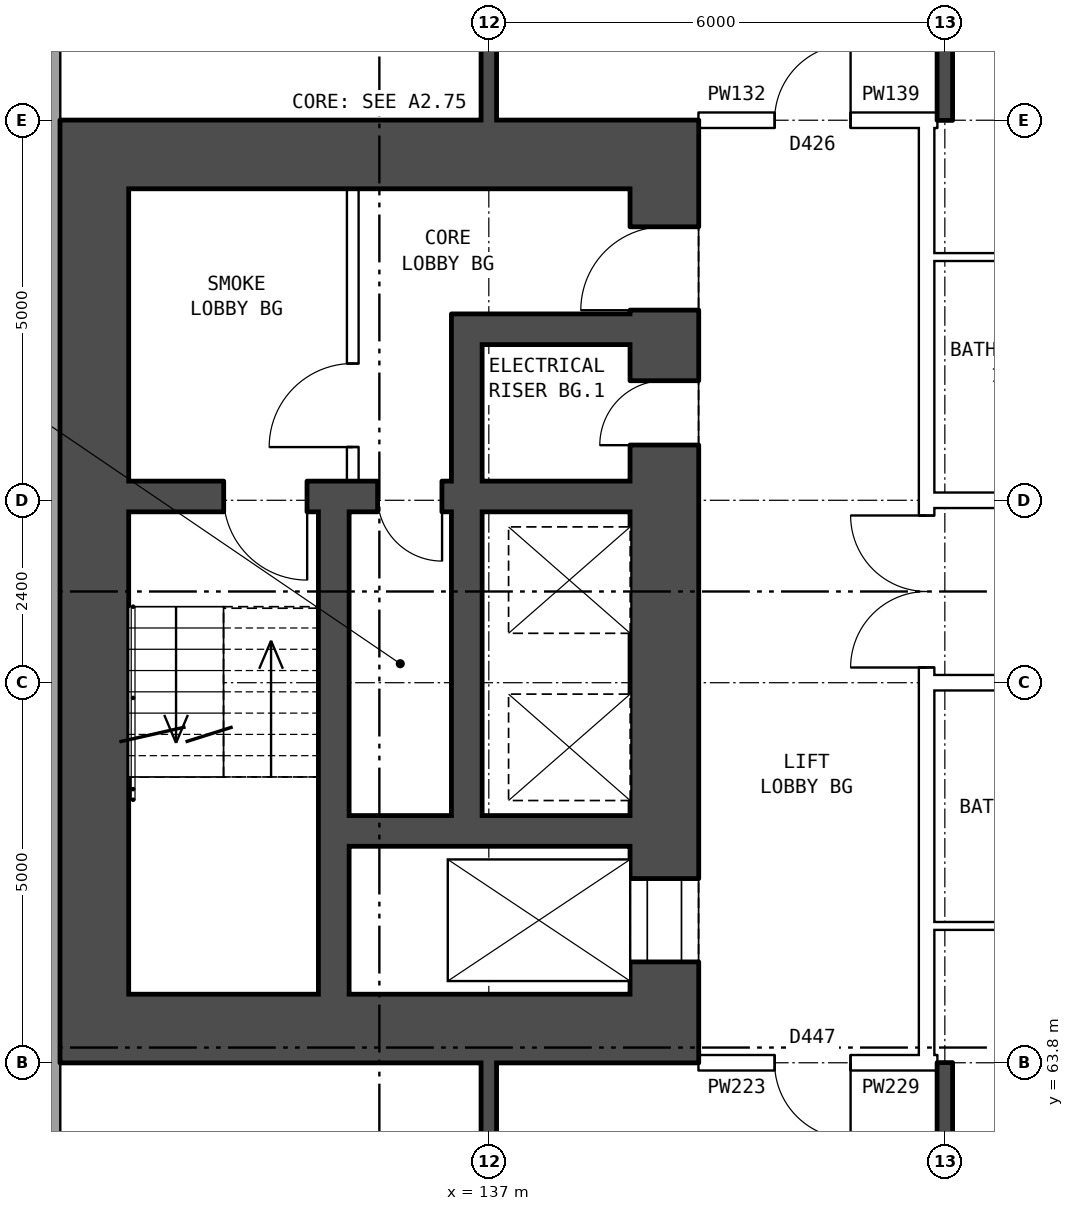
"""IFC4 building model, lengths in metres.
Left out: names, types, materials, properties, quantities, classifications, styles, units other than length and angle.
Written with IfcOpenShell. Run it as: python <this file> out.ifc"""

import sys

from ifc_helpers import new_model, si_unit, direction, frame, frame_2d, origin, place, context, subcontext, project, spatial, rectangle, extrude, element, fill, save


model = new_model("IFC4")
c1 = context("Model", 3, precision=1e-05, world=origin(), true_north=direction((0.0, 1.0)))
c2 = subcontext(c1, "Body", "Model", "MODEL_VIEW")
j1 = project(units=[si_unit("LENGTHUNIT", "METRE"), si_unit("PLANEANGLEUNIT", "RADIAN")], contexts=[c1])
p1 = place(None, origin())
s1 = spatial("IfcSite", under=j1, at=p1, CompositionType="ELEMENT")
p2 = place(p1, origin())
s2 = spatial("IfcBuilding", under=s1, at=p2, CompositionType="ELEMENT")
p3 = place(p2, frame((0.0, 0.0, 22.6)))
s3 = spatial("IfcBuildingStorey", under=s2, at=p3, CompositionType="ELEMENT", Elevation=22.6)
p4 = place(p3, frame((131.18, 82.925, 0.0), z_axis=(0.0, 0.0, 1.0), x_axis=(0.0, -1.0, 0.0)))
e1 = element("IfcWall", 1, at=p4, inside=s3, PredefinedType="STANDARD", context=c2, shape_type="SweptSolid", body=[
    extrude(rectangle(XDim=25.851, YDim=0.36, at=frame_2d((12.925, 0.0))), origin(), (0.0, 0.0, 1.0), 2.85),
])
p5 = place(p4, frame((1.625, 0.0, 0.8)))
e2 = element("IfcOpeningElement", 2, at=p5, cuts=e1, PredefinedType="OPENING", context=c2, shape_type="SweptSolid", body=[
    extrude(rectangle(XDim=1.6, YDim=1.8, at=frame_2d((0.8, 0.9))), frame((0.0, 0.19, 0.0), z_axis=(0.0, -1.0, 0.0), x_axis=(1.0, 0.0, 0.0)), (0.0, 0.0, 1.0), 0.38),
])
p6 = place(p4, frame((3.525, 0.0, 1.7)))
e3 = element("IfcOpeningElement", 3, at=p6, cuts=e1, PredefinedType="OPENING", context=c2, shape_type="SweptSolid", body=[
    extrude(rectangle(XDim=1.4, YDim=0.9, at=frame_2d((0.7, 0.45))), frame((0.0, 0.19, 0.0), z_axis=(0.0, -1.0, 0.0), x_axis=(1.0, 0.0, 0.0)), (0.0, 0.0, 1.0), 0.38),
])
p7 = place(p4, frame((20.825, 0.0, 1.7)))
e4 = element("IfcOpeningElement", 4, at=p7, cuts=e1, PredefinedType="OPENING", context=c2, shape_type="SweptSolid", body=[
    extrude(rectangle(XDim=1.4, YDim=0.9, at=frame_2d((0.7, 0.45))), frame((0.0, 0.19, 0.0), z_axis=(0.0, -1.0, 0.0), x_axis=(1.0, 0.0, 0.0)), (0.0, 0.0, 1.0), 0.38),
])
p8 = place(p4, frame((22.625, 0.0, 0.8)))
e5 = element("IfcOpeningElement", 5, at=p8, cuts=e1, PredefinedType="OPENING", context=c2, shape_type="SweptSolid", body=[
    extrude(rectangle(XDim=1.6, YDim=1.8, at=frame_2d((0.8, 0.9))), frame((0.0, 0.19, 0.0), z_axis=(0.0, -1.0, 0.0), x_axis=(1.0, 0.0, 0.0)), (0.0, 0.0, 1.0), 0.38),
])
p9 = place(p3, frame((139.31, 64.7, 0.0), z_axis=(0.0, 0.0, 1.0), x_axis=(0.0, 1.0, 0.0)))
e6 = element("IfcWall", 6, at=p9, inside=s3, PredefinedType="SHEAR", context=c2, shape_type="SweptSolid", body=[
    extrude(rectangle(XDim=10.6, YDim=0.9, at=frame_2d((5.3, 0.0))), origin(), (0.0, 0.0, 1.0), 2.85),
])
p10 = place(p9, frame((0.425, 0.0, 0.0)))
e7 = element("IfcOpeningElement", 7, at=p10, cuts=e6, PredefinedType="OPENING", context=c2, shape_type="SweptSolid", body=[
    extrude(rectangle(XDim=1.1, YDim=2.1, at=frame_2d((0.55, 1.05))), frame((0.0, 0.46, 0.0), z_axis=(0.0, -1.0, 0.0), x_axis=(1.0, 0.0, 0.0)), (0.0, 0.0, 1.0), 0.92),
])
p11 = place(p9, frame((9.0, 0.0, 0.0)))
e8 = element("IfcOpeningElement", 8, at=p11, cuts=e6, PredefinedType="OPENING", context=c2, shape_type="SweptSolid", body=[
    extrude(rectangle(XDim=1.1, YDim=2.1, at=frame_2d((0.55, 1.05))), frame((0.0, 0.46, 0.0), z_axis=(0.0, -1.0, 0.0), x_axis=(1.0, 0.0, 0.0)), (0.0, 0.0, 1.0), 0.92),
])
p12 = place(p9, frame((7.225, 0.0, 0.0)))
e9 = element("IfcOpeningElement", 9, at=p12, cuts=e6, PredefinedType="OPENING", context=c2, shape_type="SweptSolid", body=[
    extrude(rectangle(XDim=0.85, YDim=2.1, at=frame_2d((0.425, 1.05))), frame((0.0, 0.46, 0.0), z_axis=(0.0, -1.0, 0.0), x_axis=(1.0, 0.0, 0.0)), (0.0, 0.0, 1.0), 0.92),
])
p13 = place(p3, frame((131.81, 64.7, 0.0), z_axis=(0.0, 0.0, 1.0), x_axis=(0.0, 1.0, 0.0)))
e10 = element("IfcWall", 10, at=p13, inside=s3, PredefinedType="SHEAR", context=c2, shape_type="SweptSolid", body=[
    extrude(rectangle(XDim=10.6, YDim=0.9, at=frame_2d((5.3, 0.0))), origin(), (0.0, 0.0, 1.0), 2.85),
])
for number, where, z_axis, x_axis in (
    (11, (139.76, 64.25, 0.0), (0.0, 0.0, 1.0), (-1.0, 0.0, 0.0)),
    (12, (139.76, 75.75, 0.0), (0.0, 0.0, 1.0), (-1.0, 0.0, 0.0)),
):
    element("IfcWall", number, at=place(p3, frame(where, z_axis=z_axis, x_axis=x_axis)), inside=s3, PredefinedType="SHEAR", context=c2, shape_type="SweptSolid", body=[
        extrude(rectangle(XDim=8.4, YDim=0.9, at=frame_2d((4.2, 0.0))), origin(), (0.0, 0.0, 1.0), 2.85),
    ])
p14 = place(p3, frame((138.86, 66.85, 0.0), z_axis=(0.0, 0.0, 1.0), x_axis=(-1.0, 0.0, 0.0)))
e13 = element("IfcWall", 13, at=p14, inside=s3, PredefinedType="SHEAR", context=c2, shape_type="SweptSolid", body=[
    extrude(rectangle(XDim=3.7, YDim=0.4, at=frame_2d((1.85, 0.0))), origin(), (0.0, 0.0, 1.0), 2.85),
])
p15 = place(p3, frame((138.86, 71.25, 0.0), z_axis=(0.0, 0.0, 1.0), x_axis=(-1.0, 0.0, 0.0)))
e14 = element("IfcWall", 14, at=p15, inside=s3, PredefinedType="SHEAR", context=c2, shape_type="SweptSolid", body=[
    extrude(rectangle(XDim=6.6, YDim=0.4, at=frame_2d((3.3, 0.0))), origin(), (0.0, 0.0, 1.0), 2.85),
])
p16 = place(p15, frame((4.25, 0.0, 0.0)))
e15 = element("IfcOpeningElement", 15, at=p16, cuts=e14, PredefinedType="OPENING", context=c2, shape_type="SweptSolid", body=[
    extrude(rectangle(XDim=1.1, YDim=2.1, at=frame_2d((0.55, 1.05))), frame((0.0, 0.21, 0.0), z_axis=(0.0, -1.0, 0.0), x_axis=(1.0, 0.0, 0.0)), (0.0, 0.0, 1.0), 0.42),
])
p17 = place(p15, frame((2.475, 0.0, 0.0)))
e16 = element("IfcOpeningElement", 16, at=p17, cuts=e14, PredefinedType="OPENING", context=c2, shape_type="SweptSolid", body=[
    extrude(rectangle(XDim=0.85, YDim=2.1, at=frame_2d((0.425, 1.05))), frame((0.0, 0.21, 0.0), z_axis=(0.0, -1.0, 0.0), x_axis=(1.0, 0.0, 0.0)), (0.0, 0.0, 1.0), 0.42),
])
p18 = place(p3, frame((138.86, 73.45, 0.0), z_axis=(0.0, 0.0, 1.0), x_axis=(-1.0, 0.0, 0.0)))
e17 = element("IfcWall", 17, at=p18, inside=s3, PredefinedType="SHEAR", context=c2, shape_type="SweptSolid", body=[
    extrude(rectangle(XDim=1.95, YDim=0.4, at=frame_2d((0.975, 0.0))), origin(), (0.0, 0.0, 1.0), 2.85),
])
p19 = place(p3, frame((136.71, 67.05, 0.0), z_axis=(0.0, 0.0, 1.0), x_axis=(0.0, 1.0, 0.0)))
e18 = element("IfcWall", 18, at=p19, inside=s3, PredefinedType="SHEAR", context=c2, shape_type="SweptSolid", body=[
    extrude(rectangle(XDim=4.0, YDim=0.4, at=frame_2d((2.0, 0.0))), origin(), (0.0, 0.0, 1.0), 2.85),
])
p20 = place(p3, frame((136.71, 71.45, 0.0), z_axis=(0.0, 0.0, 1.0), x_axis=(0.0, 1.0, 0.0)))
e19 = element("IfcWall", 19, at=p20, inside=s3, PredefinedType="SHEAR", context=c2, shape_type="SweptSolid", body=[
    extrude(rectangle(XDim=2.2, YDim=0.4, at=frame_2d((1.1, 0.0))), origin(), (0.0, 0.0, 1.0), 2.85),
])
p21 = place(p3, frame((135.21, 71.45, 0.0), z_axis=(0.0, 0.0, 1.0), x_axis=(0.0, 1.0, 0.0)))
e20 = element("IfcWall", 20, at=p21, inside=s3, PredefinedType="PARTITIONING", context=c2, shape_type="SweptSolid", body=[
    extrude(rectangle(XDim=3.85, YDim=0.15, at=frame_2d((1.925, 0.0))), origin(), (0.0, 0.0, 1.0), 2.85),
])
p22 = place(p21, frame((0.45, 0.0, 0.0)))
e21 = element("IfcOpeningElement", 21, at=p22, cuts=e20, PredefinedType="OPENING", context=c2, shape_type="SweptSolid", body=[
    extrude(rectangle(XDim=1.1, YDim=2.1, at=frame_2d((0.55, 1.05))), frame((0.0, 0.085, 0.0), z_axis=(0.0, -1.0, 0.0), x_axis=(1.0, 0.0, 0.0)), (0.0, 0.0, 1.0), 0.17),
])
p23 = place(p3, frame((134.96, 64.7, 0.0), z_axis=(0.0, 0.0, 1.0), x_axis=(0.0, 1.0, 0.0)))
e22 = element("IfcWall", 22, at=p23, inside=s3, PredefinedType="SHEAR", context=c2, shape_type="SweptSolid", body=[
    extrude(rectangle(XDim=6.35, YDim=0.4, at=frame_2d((3.175, 0.0))), origin(), (0.0, 0.0, 1.0), 2.85),
])
p24 = place(p3, frame((142.76, 63.9, 0.0), z_axis=(0.0, 0.0, 1.0), x_axis=(0.0, 1.0, 0.0)))
e23 = element("IfcWall", 23, at=p24, inside=s3, PredefinedType="PARTITIONING", context=c2, shape_type="SweptSolid", body=[
    extrude(rectangle(XDim=12.2, YDim=0.2, at=frame_2d((6.1, 0.0))), origin(), (0.0, 0.0, 1.0), 2.85),
])
p25 = place(p24, frame((5.1, 0.0, 0.0)))
e24 = element("IfcOpeningElement", 24, at=p25, cuts=e23, PredefinedType="OPENING", context=c2, shape_type="SweptSolid", body=[
    extrude(rectangle(XDim=2.0, YDim=2.1, at=frame_2d((1.0, 1.05))), frame((0.0, 0.11, 0.0), z_axis=(0.0, -1.0, 0.0), x_axis=(1.0, 0.0, 0.0)), (0.0, 0.0, 1.0), 0.22),
])
p26 = place(p3, frame((139.76, 63.8, 0.0), z_axis=(0.0, 0.0, 1.0), x_axis=(1.0, 0.0, 0.0)))
e25 = element("IfcWall", 25, at=p26, inside=s3, PredefinedType="PARTITIONING", context=c2, shape_type="SweptSolid", body=[
    extrude(rectangle(XDim=3.0, YDim=0.2, at=frame_2d((1.5, 0.0))), origin(), (0.0, 0.0, 1.0), 2.85),
])
p27 = place(p26, frame((1.0, 0.0, 0.0)))
e26 = element("IfcOpeningElement", 26, at=p27, cuts=e25, PredefinedType="OPENING", context=c2, shape_type="SweptSolid", body=[
    extrude(rectangle(XDim=1.0, YDim=2.1, at=frame_2d((0.5, 1.05))), frame((0.0, 0.11, 0.0), z_axis=(0.0, -1.0, 0.0), x_axis=(1.0, 0.0, 0.0)), (0.0, 0.0, 1.0), 0.22),
])
p28 = place(p3, frame((142.76, 63.8, 0.0), z_axis=(0.0, 0.0, 1.0), x_axis=(1.0, 0.0, 0.0)))
e27 = element("IfcWall", 27, at=p28, inside=s3, PredefinedType="PARTITIONING", context=c2, shape_type="SweptSolid", body=[
    extrude(rectangle(XDim=0.14, YDim=0.2, at=frame_2d((0.07, 0.0))), origin(), (0.0, 0.0, 1.0), 2.85),
])
p29 = place(p3, frame((142.76, 65.6, 0.0), z_axis=(0.0, 0.0, 1.0), x_axis=(1.0, 0.0, 0.0)))
e28 = element("IfcWall", 28, at=p29, inside=s3, PredefinedType="PARTITIONING", context=c2, shape_type="SweptSolid", body=[
    extrude(rectangle(XDim=3.24, YDim=0.1, at=frame_2d((1.62, 0.0))), origin(), (0.0, 0.0, 1.0), 2.85),
])
p30 = place(p3, frame((142.76, 68.8, 0.0), z_axis=(0.0, 0.0, 1.0), x_axis=(1.0, 0.0, 0.0)))
e29 = element("IfcWall", 29, at=p30, inside=s3, PredefinedType="PARTITIONING", context=c2, shape_type="SweptSolid", body=[
    extrude(rectangle(XDim=14.48, YDim=0.2, at=frame_2d((7.24, 0.0))), origin(), (0.0, 0.0, 1.0), 2.85),
])
p31 = place(p30, frame((4.24, 0.0, 0.0)))
e30 = element("IfcOpeningElement", 30, at=p31, cuts=e29, PredefinedType="OPENING", context=c2, shape_type="SweptSolid", body=[
    extrude(rectangle(XDim=1.0, YDim=2.1, at=frame_2d((0.5, 1.05))), frame((0.0, 0.11, 0.0), z_axis=(0.0, -1.0, 0.0), x_axis=(1.0, 0.0, 0.0)), (0.0, 0.0, 1.0), 0.22),
])
p32 = place(p30, frame((7.24, 0.0, 0.0)))
e31 = element("IfcOpeningElement", 31, at=p32, cuts=e29, PredefinedType="OPENING", context=c2, shape_type="SweptSolid", body=[
    extrude(rectangle(XDim=1.0, YDim=2.1, at=frame_2d((0.5, 1.05))), frame((0.0, 0.11, 0.0), z_axis=(0.0, -1.0, 0.0), x_axis=(1.0, 0.0, 0.0)), (0.0, 0.0, 1.0), 0.22),
])
p33 = place(p3, frame((142.76, 71.2, 0.0), z_axis=(0.0, 0.0, 1.0), x_axis=(1.0, 0.0, 0.0)))
e32 = element("IfcWall", 32, at=p33, inside=s3, PredefinedType="PARTITIONING", context=c2, shape_type="SweptSolid", body=[
    extrude(rectangle(XDim=14.48, YDim=0.2, at=frame_2d((7.24, 0.0))), origin(), (0.0, 0.0, 1.0), 2.85),
])
p34 = place(p33, frame((4.24, 0.0, 0.0)))
e33 = element("IfcOpeningElement", 33, at=p34, cuts=e32, PredefinedType="OPENING", context=c2, shape_type="SweptSolid", body=[
    extrude(rectangle(XDim=1.0, YDim=2.1, at=frame_2d((0.5, 1.05))), frame((0.0, 0.11, 0.0), z_axis=(0.0, -1.0, 0.0), x_axis=(1.0, 0.0, 0.0)), (0.0, 0.0, 1.0), 0.22),
])
p35 = place(p33, frame((10.24, 0.0, 0.0)))
e34 = element("IfcOpeningElement", 34, at=p35, cuts=e32, PredefinedType="OPENING", context=c2, shape_type="SweptSolid", body=[
    extrude(rectangle(XDim=1.0, YDim=2.1, at=frame_2d((0.5, 1.05))), frame((0.0, 0.11, 0.0), z_axis=(0.0, -1.0, 0.0), x_axis=(1.0, 0.0, 0.0)), (0.0, 0.0, 1.0), 0.22),
])
p36 = place(p3, frame((142.76, 74.4, 0.0), z_axis=(0.0, 0.0, 1.0), x_axis=(1.0, 0.0, 0.0)))
e35 = element("IfcWall", 35, at=p36, inside=s3, PredefinedType="PARTITIONING", context=c2, shape_type="SweptSolid", body=[
    extrude(rectangle(XDim=3.24, YDim=0.1, at=frame_2d((1.62, 0.0))), origin(), (0.0, 0.0, 1.0), 2.85),
])
p37 = place(p3, frame((139.76, 76.2, 0.0), z_axis=(0.0, 0.0, 1.0), x_axis=(1.0, 0.0, 0.0)))
e36 = element("IfcWall", 36, at=p37, inside=s3, PredefinedType="PARTITIONING", context=c2, shape_type="SweptSolid", body=[
    extrude(rectangle(XDim=3.0, YDim=0.2, at=frame_2d((1.5, 0.0))), origin(), (0.0, 0.0, 1.0), 2.85),
])
p38 = place(p37, frame((1.0, 0.0, 0.0)))
e37 = element("IfcOpeningElement", 37, at=p38, cuts=e36, PredefinedType="OPENING", context=c2, shape_type="SweptSolid", body=[
    extrude(rectangle(XDim=1.0, YDim=2.1, at=frame_2d((0.5, 1.05))), frame((0.0, 0.11, 0.0), z_axis=(0.0, -1.0, 0.0), x_axis=(1.0, 0.0, 0.0)), (0.0, 0.0, 1.0), 0.22),
])
p39 = place(p3, frame((142.76, 76.2, 0.0), z_axis=(0.0, 0.0, 1.0), x_axis=(1.0, 0.0, 0.0)))
e38 = element("IfcWall", 38, at=p39, inside=s3, PredefinedType="PARTITIONING", context=c2, shape_type="SweptSolid", body=[
    extrude(rectangle(XDim=0.14, YDim=0.2, at=frame_2d((0.07, 0.0))), origin(), (0.0, 0.0, 1.0), 2.85),
])
p40 = place(p3, frame((137.0, 54.36, 0.0), z_axis=(0.0, 0.0, 1.0), x_axis=(0.0, 1.0, 0.0)))
e39 = element("IfcWall", 39, at=p40, inside=s3, PredefinedType="SOLIDWALL", context=c2, shape_type="SweptSolid", body=[
    extrude(rectangle(XDim=9.44, YDim=0.2, at=frame_2d((4.72, 0.0))), origin(), (0.0, 0.0, 1.0), 2.85),
])
p41 = place(p40, frame((7.04, 0.0, 0.0)))
e40 = element("IfcOpeningElement", 40, at=p41, cuts=e39, PredefinedType="OPENING", context=c2, shape_type="SweptSolid", body=[
    extrude(rectangle(XDim=0.9, YDim=2.1, at=frame_2d((0.45, 1.05))), frame((0.0, 0.11, 0.0), z_axis=(0.0, -1.0, 0.0), x_axis=(1.0, 0.0, 0.0)), (0.0, 0.0, 1.0), 0.22),
])
p42 = place(p3, frame((137.0, 76.2, 0.0), z_axis=(0.0, 0.0, 1.0), x_axis=(0.0, 1.0, 0.0)))
e41 = element("IfcWall", 41, at=p42, inside=s3, PredefinedType="SOLIDWALL", context=c2, shape_type="SweptSolid", body=[
    extrude(rectangle(XDim=9.44, YDim=0.2, at=frame_2d((4.72, 0.0))), origin(), (0.0, 0.0, 1.0), 2.85),
])
p43 = place(p42, frame((1.5, 0.0, 0.0)))
e42 = element("IfcOpeningElement", 42, at=p43, cuts=e41, PredefinedType="OPENING", context=c2, shape_type="SweptSolid", body=[
    extrude(rectangle(XDim=0.9, YDim=2.1, at=frame_2d((0.45, 1.05))), frame((0.0, 0.11, 0.0), z_axis=(0.0, -1.0, 0.0), x_axis=(1.0, 0.0, 0.0)), (0.0, 0.0, 1.0), 0.22),
])
for number, where, z_axis, x_axis in (
    (43, (143.0, 54.36, 0.0), (0.0, 0.0, 1.0), (0.0, 1.0, 0.0)),
    (44, (143.0, 76.2, 0.0), (0.0, 0.0, 1.0), (0.0, 1.0, 0.0)),
):
    element("IfcWall", number, at=place(p3, frame(where, z_axis=z_axis, x_axis=x_axis)), inside=s3, PredefinedType="SOLIDWALL", context=c2, shape_type="SweptSolid", body=[
        extrude(rectangle(XDim=9.44, YDim=0.2, at=frame_2d((4.72, 0.0))), origin(), (0.0, 0.0, 1.0), 2.85),
    ])
p44 = place(p10, origin())
e45 = element("IfcDoor", 45, at=p44, inside=s3, OperationType="DOUBLE_DOOR_SLIDING", PredefinedType="DOOR", context=c2, shape_type="SweptSolid", body=[
    extrude(rectangle(XDim=1.1, YDim=2.1, at=frame_2d((0.55, 1.05))), frame((0.0, 0.435, 0.0), z_axis=(0.0, -1.0, 0.0), x_axis=(1.0, 0.0, 0.0)), (0.0, 0.0, 1.0), 0.05),
])
fill(e7, e45)
p45 = place(p11, origin())
e46 = element("IfcDoor", 46, at=p45, inside=s3, OperationType="SINGLE_SWING_LEFT", PredefinedType="DOOR", context=c2, shape_type="SweptSolid", body=[
    extrude(rectangle(XDim=1.1, YDim=2.1, at=frame_2d((0.55, 1.05))), frame((0.0, 0.435, 0.0), z_axis=(0.0, -1.0, 0.0), x_axis=(1.0, 0.0, 0.0)), (0.0, 0.0, 1.0), 0.05),
])
fill(e8, e46)
p46 = place(p22, origin())
e47 = element("IfcDoor", 47, at=p46, inside=s3, OperationType="SINGLE_SWING_LEFT", PredefinedType="DOOR", context=c2, shape_type="SweptSolid", body=[
    extrude(rectangle(XDim=1.1, YDim=2.1, at=frame_2d((0.55, 1.05))), frame((0.0, 0.025, 0.0), z_axis=(0.0, -1.0, 0.0), x_axis=(1.0, 0.0, 0.0)), (0.0, 0.0, 1.0), 0.05),
])
fill(e21, e47)
p47 = place(p16, origin())
e48 = element("IfcDoor", 48, at=p47, inside=s3, OperationType="SINGLE_SWING_LEFT", PredefinedType="DOOR", context=c2, shape_type="SweptSolid", body=[
    extrude(rectangle(XDim=1.1, YDim=2.1, at=frame_2d((0.55, 1.05))), frame((0.0, 0.025, 0.0), z_axis=(0.0, -1.0, 0.0), x_axis=(1.0, 0.0, 0.0)), (0.0, 0.0, 1.0), 0.05),
])
fill(e15, e48)
p48 = place(p12, origin())
e49 = element("IfcDoor", 49, at=p48, inside=s3, OperationType="SINGLE_SWING_LEFT", PredefinedType="DOOR", context=c2, shape_type="SweptSolid", body=[
    extrude(rectangle(XDim=0.85, YDim=2.1, at=frame_2d((0.425, 1.05))), frame((0.0, 0.435, 0.0), z_axis=(0.0, -1.0, 0.0), x_axis=(1.0, 0.0, 0.0)), (0.0, 0.0, 1.0), 0.05),
])
fill(e9, e49)
p49 = place(p17, origin())
e50 = element("IfcDoor", 50, at=p49, inside=s3, OperationType="SINGLE_SWING_LEFT", PredefinedType="DOOR", context=c2, shape_type="SweptSolid", body=[
    extrude(rectangle(XDim=0.85, YDim=2.1, at=frame_2d((0.425, 1.05))), frame((0.0, 0.025, 0.0), z_axis=(0.0, -1.0, 0.0), x_axis=(1.0, 0.0, 0.0)), (0.0, 0.0, 1.0), 0.05),
])
fill(e16, e50)
p50 = place(p25, origin())
e51 = element("IfcDoor", 51, at=p50, inside=s3, OperationType="DOUBLE_DOOR_SINGLE_SWING", PredefinedType="DOOR", context=c2, shape_type="SweptSolid", body=[
    extrude(rectangle(XDim=2.0, YDim=2.1, at=frame_2d((1.0, 1.05))), frame((0.0, 0.025, 0.0), z_axis=(0.0, -1.0, 0.0), x_axis=(1.0, 0.0, 0.0)), (0.0, 0.0, 1.0), 0.05),
])
fill(e24, e51)
p51 = place(p27, frame((1.0, 0.0, 0.0), z_axis=(0.0, 0.0, 1.0), x_axis=(-1.0, 0.0, 0.0)))
e52 = element("IfcDoor", 52, at=p51, inside=s3, OperationType="SINGLE_SWING_LEFT", PredefinedType="DOOR", context=c2, shape_type="SweptSolid", body=[
    extrude(rectangle(XDim=1.0, YDim=2.1, at=frame_2d((0.5, 1.05))), frame((0.0, 0.025, 0.0), z_axis=(0.0, -1.0, 0.0), x_axis=(1.0, 0.0, 0.0)), (0.0, 0.0, 1.0), 0.05),
])
fill(e26, e52)
p52 = place(p38, origin())
e53 = element("IfcDoor", 53, at=p52, inside=s3, OperationType="SINGLE_SWING_RIGHT", PredefinedType="DOOR", context=c2, shape_type="SweptSolid", body=[
    extrude(rectangle(XDim=1.0, YDim=2.1, at=frame_2d((0.5, 1.05))), frame((0.0, 0.025, 0.0), z_axis=(0.0, -1.0, 0.0), x_axis=(1.0, 0.0, 0.0)), (0.0, 0.0, 1.0), 0.05),
])
fill(e37, e53)
save(model, sys.argv[1])
